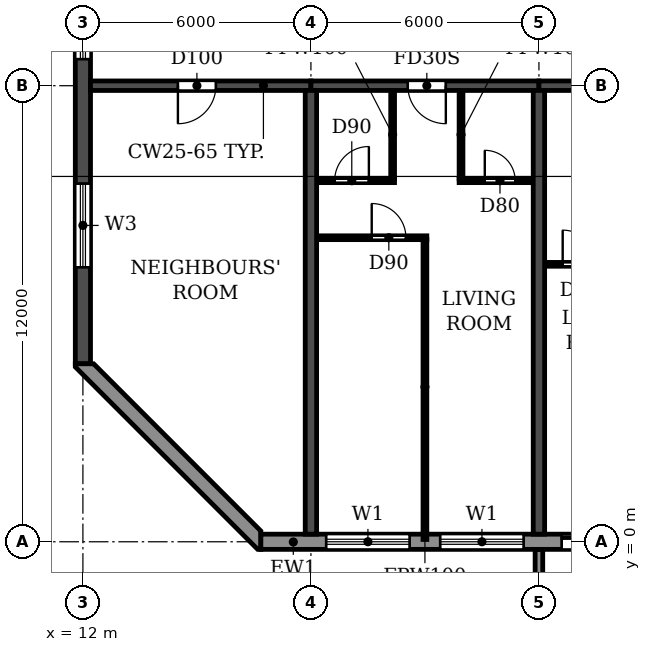
"""IFC4 building model, lengths in metres.
Left out: names, types, materials, properties, quantities, classifications, styles, units other than length and angle.
Written with IfcOpenShell. Run it as: python <this file> out.ifc"""

import sys

from ifc_helpers import new_model, si_unit, direction, frame, frame_2d, origin, place, context, subcontext, project, spatial, polyline, rectangle, outline, extrude, source, transform, mapped, element, fill, save


model = new_model("IFC4")
c1 = context("Model", 3, precision=1e-05, world=origin(), true_north=direction((0.0, 1.0)))
c2 = subcontext(c1, "Body", "Model", "MODEL_VIEW")
j1 = project(units=[si_unit("LENGTHUNIT", "METRE"), si_unit("PLANEANGLEUNIT", "RADIAN")], contexts=[c1])
p1 = place(None, origin())
s1 = spatial("IfcSite", under=j1, at=p1, CompositionType="ELEMENT")
p2 = place(p1, origin())
s2 = spatial("IfcBuilding", under=s1, at=p2, CompositionType="ELEMENT")
p3 = place(p2, frame((0.0, 0.0, 152.1)))
s3 = spatial("IfcBuildingStorey", under=s2, at=p3, CompositionType="ELEMENT", Elevation=152.1)
for number, where, z_axis, x_axis in (
    (1, (18.0, 0.2, 0.0), (0.0, 0.0, 1.0), (0.0, 1.0, 0.0)),
    (2, (24.0, 0.2, 0.0), (0.0, 0.0, 1.0), (0.0, 1.0, 0.0)),
):
    element("IfcWall", number, at=place(p3, frame(where, z_axis=z_axis, x_axis=x_axis)), inside=s3, PredefinedType="SHEAR", context=c2, shape_type="SweptSolid", body=[
        extrude(rectangle(XDim=11.675, YDim=0.3, at=frame_2d((5.837, 0.0))), origin(), (0.0, 0.0, 1.0), 3.07),
    ])
p4 = place(p3, frame((12.0, 4.683, 0.0), z_axis=(0.0, 0.0, 1.0), x_axis=(0.0, 1.0, 0.0)))
e3 = element("IfcWall", 3, at=p4, inside=s3, PredefinedType="SHEAR", context=c2, shape_type="SweptSolid", body=[
    extrude(rectangle(XDim=33.034, YDim=0.4, at=frame_2d((16.517, 0.0))), origin(), (0.0, 0.0, 1.0), 3.07),
])
p5 = place(p4, frame((23.817, 0.0, 0.9)))
e4 = element("IfcOpeningElement", 4, at=p5, cuts=e3, PredefinedType="OPENING", context=c2, shape_type="SweptSolid", body=[
    extrude(rectangle(XDim=1.2, YDim=1.5, at=frame_2d((0.6, 0.75))), frame((0.0, 0.21, 0.0), z_axis=(0.0, -1.0, 0.0), x_axis=(1.0, 0.0, 0.0)), (0.0, 0.0, 1.0), 0.42),
])
p6 = place(p4, frame((8.017, 0.0, 0.9)))
e5 = element("IfcOpeningElement", 5, at=p6, cuts=e3, PredefinedType="OPENING", context=c2, shape_type="SweptSolid", body=[
    extrude(rectangle(XDim=1.2, YDim=1.5, at=frame_2d((0.6, 0.75))), frame((0.0, 0.21, 0.0), z_axis=(0.0, -1.0, 0.0), x_axis=(1.0, 0.0, 0.0)), (0.0, 0.0, 1.0), 0.42),
])
p7 = place(p4, frame((28.293, 0.0, 0.6)))
e6 = element("IfcOpeningElement", 6, at=p7, cuts=e3, PredefinedType="OPENING", context=c2, shape_type="SweptSolid", body=[
    extrude(rectangle(XDim=2.2, YDim=1.8, at=frame_2d((1.1, 0.9))), frame((0.0, 0.21, 0.0), z_axis=(0.0, -1.0, 0.0), x_axis=(1.0, 0.0, 0.0)), (0.0, 0.0, 1.0), 0.42),
])
p8 = place(p4, frame((2.541, 0.0, 0.6)))
e7 = element("IfcOpeningElement", 7, at=p8, cuts=e3, PredefinedType="OPENING", context=c2, shape_type="SweptSolid", body=[
    extrude(rectangle(XDim=2.2, YDim=1.8, at=frame_2d((1.1, 0.9))), frame((0.0, 0.21, 0.0), z_axis=(0.0, -1.0, 0.0), x_axis=(1.0, 0.0, 0.0)), (0.0, 0.0, 1.0), 0.42),
])
p9 = place(p3, frame((12.2, 12.0, 0.0), z_axis=(0.0, 0.0, 1.0), x_axis=(1.0, 0.0, 0.0)))
e8 = element("IfcWall", 8, at=p9, inside=s3, PredefinedType="SHEAR", context=c2, shape_type="SweptSolid", body=[
    extrude(rectangle(XDim=5.8, YDim=0.25, at=frame_2d((2.9, 0.0))), origin(), (0.0, 0.0, 1.0), 2.47),
])
p10 = place(p9, frame((2.3, 0.0, 0.0)))
e9 = element("IfcOpeningElement", 9, at=p10, cuts=e8, PredefinedType="OPENING", context=c2, shape_type="SweptSolid", body=[
    extrude(rectangle(XDim=1.0, YDim=2.1, at=frame_2d((0.5, 1.05))), frame((0.0, 0.135, 0.0), z_axis=(0.0, -1.0, 0.0), x_axis=(1.0, 0.0, 0.0)), (0.0, 0.0, 1.0), 0.27),
])
p11 = place(p3, frame((18.0, 12.0, 0.0), z_axis=(0.0, 0.0, 1.0), x_axis=(1.0, 0.0, 0.0)))
e10 = element("IfcWall", 10, at=p11, inside=s3, PredefinedType="SHEAR", context=c2, shape_type="SweptSolid", body=[
    extrude(rectangle(XDim=6.0, YDim=0.25, at=frame_2d((3.0, 0.0))), origin(), (0.0, 0.0, 1.0), 2.47),
])
p12 = place(p11, frame((2.55, 0.0, 0.0)))
e11 = element("IfcOpeningElement", 11, at=p12, cuts=e10, PredefinedType="OPENING", context=c2, shape_type="SweptSolid", body=[
    extrude(rectangle(XDim=1.0, YDim=2.1, at=frame_2d((0.5, 1.05))), frame((0.0, 0.135, 0.0), z_axis=(0.0, -1.0, 0.0), x_axis=(1.0, 0.0, 0.0)), (0.0, 0.0, 1.0), 0.27),
])
p13 = place(p3, frame((24.0, 12.0, 0.0), z_axis=(0.0, 0.0, 1.0), x_axis=(1.0, 0.0, 0.0)))
e12 = element("IfcWall", 12, at=p13, inside=s3, PredefinedType="SHEAR", context=c2, shape_type="SweptSolid", body=[
    extrude(rectangle(XDim=6.0, YDim=0.25, at=frame_2d((3.0, 0.0))), origin(), (0.0, 0.0, 1.0), 2.47),
])
p14 = place(p13, frame((2.55, 0.0, 0.0)))
e13 = element("IfcOpeningElement", 13, at=p14, cuts=e12, PredefinedType="OPENING", context=c2, shape_type="SweptSolid", body=[
    extrude(rectangle(XDim=1.0, YDim=2.1, at=frame_2d((0.5, 1.05))), frame((0.0, 0.135, 0.0), z_axis=(0.0, -1.0, 0.0), x_axis=(1.0, 0.0, 0.0)), (0.0, 0.0, 1.0), 0.27),
])
p15 = place(p3, frame((16.683, 0.0, 0.0), z_axis=(0.0, 0.0, 1.0), x_axis=(1.0, 0.0, 0.0)))
e14 = element("IfcWall", 14, at=p15, inside=s3, PredefinedType="STANDARD", context=c2, shape_type="SweptSolid", body=[
    extrude(rectangle(XDim=68.634, YDim=0.4, at=frame_2d((34.317, 0.0))), origin(), (0.0, 0.0, 1.0), 3.07),
])
p16 = place(p15, frame((1.717, 0.0, 0.9)))
e15 = element("IfcOpeningElement", 15, at=p16, cuts=e14, PredefinedType="OPENING", context=c2, shape_type="SweptSolid", body=[
    extrude(rectangle(XDim=2.2, YDim=1.5, at=frame_2d((1.1, 0.75))), frame((0.0, 0.21, 0.0), z_axis=(0.0, -1.0, 0.0), x_axis=(1.0, 0.0, 0.0)), (0.0, 0.0, 1.0), 0.42),
])
p17 = place(p15, frame((4.717, 0.0, 0.9)))
e16 = element("IfcOpeningElement", 16, at=p17, cuts=e14, PredefinedType="OPENING", context=c2, shape_type="SweptSolid", body=[
    extrude(rectangle(XDim=2.2, YDim=1.5, at=frame_2d((1.1, 0.75))), frame((0.0, 0.21, 0.0), z_axis=(0.0, -1.0, 0.0), x_axis=(1.0, 0.0, 0.0)), (0.0, 0.0, 1.0), 0.42),
])
p18 = place(p15, frame((7.917, 0.0, 0.0)))
e17 = element("IfcOpeningElement", 17, at=p18, cuts=e14, PredefinedType="OPENING", context=c2, shape_type="SweptSolid", body=[
    extrude(rectangle(XDim=1.8, YDim=2.4, at=frame_2d((0.9, 1.2))), frame((0.0, 0.21, 0.0), z_axis=(0.0, -1.0, 0.0), x_axis=(1.0, 0.0, 0.0)), (0.0, 0.0, 1.0), 0.42),
])
p19 = place(p15, frame((10.717, 0.0, 0.9)))
e18 = element("IfcOpeningElement", 18, at=p19, cuts=e14, PredefinedType="OPENING", context=c2, shape_type="SweptSolid", body=[
    extrude(rectangle(XDim=2.2, YDim=1.5, at=frame_2d((1.1, 0.75))), frame((0.0, 0.21, 0.0), z_axis=(0.0, -1.0, 0.0), x_axis=(1.0, 0.0, 0.0)), (0.0, 0.0, 1.0), 0.42),
])
p20 = place(p15, frame((13.717, 0.0, 0.9)))
e19 = element("IfcOpeningElement", 19, at=p20, cuts=e14, PredefinedType="OPENING", context=c2, shape_type="SweptSolid", body=[
    extrude(rectangle(XDim=2.2, YDim=1.5, at=frame_2d((1.1, 0.75))), frame((0.0, 0.21, 0.0), z_axis=(0.0, -1.0, 0.0), x_axis=(1.0, 0.0, 0.0)), (0.0, 0.0, 1.0), 0.42),
])
p21 = place(p15, frame((16.717, 0.0, 0.9)))
e20 = element("IfcOpeningElement", 20, at=p21, cuts=e14, PredefinedType="OPENING", context=c2, shape_type="SweptSolid", body=[
    extrude(rectangle(XDim=2.2, YDim=1.5, at=frame_2d((1.1, 0.75))), frame((0.0, 0.21, 0.0), z_axis=(0.0, -1.0, 0.0), x_axis=(1.0, 0.0, 0.0)), (0.0, 0.0, 1.0), 0.42),
])
p22 = place(p15, frame((19.717, 0.0, 0.9)))
e21 = element("IfcOpeningElement", 21, at=p22, cuts=e14, PredefinedType="OPENING", context=c2, shape_type="SweptSolid", body=[
    extrude(rectangle(XDim=2.2, YDim=1.5, at=frame_2d((1.1, 0.75))), frame((0.0, 0.21, 0.0), z_axis=(0.0, -1.0, 0.0), x_axis=(1.0, 0.0, 0.0)), (0.0, 0.0, 1.0), 0.42),
])
p23 = place(p15, frame((22.917, 0.0, 0.0)))
e22 = element("IfcOpeningElement", 22, at=p23, cuts=e14, PredefinedType="OPENING", context=c2, shape_type="SweptSolid", body=[
    extrude(rectangle(XDim=1.8, YDim=2.4, at=frame_2d((0.9, 1.2))), frame((0.0, 0.21, 0.0), z_axis=(0.0, -1.0, 0.0), x_axis=(1.0, 0.0, 0.0)), (0.0, 0.0, 1.0), 0.42),
])
p24 = place(p15, frame((25.717, 0.0, 0.9)))
e23 = element("IfcOpeningElement", 23, at=p24, cuts=e14, PredefinedType="OPENING", context=c2, shape_type="SweptSolid", body=[
    extrude(rectangle(XDim=2.2, YDim=1.5, at=frame_2d((1.1, 0.75))), frame((0.0, 0.21, 0.0), z_axis=(0.0, -1.0, 0.0), x_axis=(1.0, 0.0, 0.0)), (0.0, 0.0, 1.0), 0.42),
])
p25 = place(p15, frame((28.717, 0.0, 0.9)))
e24 = element("IfcOpeningElement", 24, at=p25, cuts=e14, PredefinedType="OPENING", context=c2, shape_type="SweptSolid", body=[
    extrude(rectangle(XDim=2.2, YDim=1.5, at=frame_2d((1.1, 0.75))), frame((0.0, 0.21, 0.0), z_axis=(0.0, -1.0, 0.0), x_axis=(1.0, 0.0, 0.0)), (0.0, 0.0, 1.0), 0.42),
])
p26 = place(p15, frame((31.917, 0.0, 0.0)))
e25 = element("IfcOpeningElement", 25, at=p26, cuts=e14, PredefinedType="OPENING", context=c2, shape_type="SweptSolid", body=[
    extrude(rectangle(XDim=1.8, YDim=2.4, at=frame_2d((0.9, 1.2))), frame((0.0, 0.21, 0.0), z_axis=(0.0, -1.0, 0.0), x_axis=(1.0, 0.0, 0.0)), (0.0, 0.0, 1.0), 0.42),
])
p27 = place(p15, frame((34.717, 0.0, 0.9)))
e26 = element("IfcOpeningElement", 26, at=p27, cuts=e14, PredefinedType="OPENING", context=c2, shape_type="SweptSolid", body=[
    extrude(rectangle(XDim=2.2, YDim=1.5, at=frame_2d((1.1, 0.75))), frame((0.0, 0.21, 0.0), z_axis=(0.0, -1.0, 0.0), x_axis=(1.0, 0.0, 0.0)), (0.0, 0.0, 1.0), 0.42),
])
p28 = place(p15, frame((37.717, 0.0, 0.9)))
e27 = element("IfcOpeningElement", 27, at=p28, cuts=e14, PredefinedType="OPENING", context=c2, shape_type="SweptSolid", body=[
    extrude(rectangle(XDim=2.2, YDim=1.5, at=frame_2d((1.1, 0.75))), frame((0.0, 0.21, 0.0), z_axis=(0.0, -1.0, 0.0), x_axis=(1.0, 0.0, 0.0)), (0.0, 0.0, 1.0), 0.42),
])
p29 = place(p15, frame((40.717, 0.0, 0.9)))
e28 = element("IfcOpeningElement", 28, at=p29, cuts=e14, PredefinedType="OPENING", context=c2, shape_type="SweptSolid", body=[
    extrude(rectangle(XDim=2.2, YDim=1.5, at=frame_2d((1.1, 0.75))), frame((0.0, 0.21, 0.0), z_axis=(0.0, -1.0, 0.0), x_axis=(1.0, 0.0, 0.0)), (0.0, 0.0, 1.0), 0.42),
])
p30 = place(p15, frame((43.717, 0.0, 0.9)))
e29 = element("IfcOpeningElement", 29, at=p30, cuts=e14, PredefinedType="OPENING", context=c2, shape_type="SweptSolid", body=[
    extrude(rectangle(XDim=2.2, YDim=1.5, at=frame_2d((1.1, 0.75))), frame((0.0, 0.21, 0.0), z_axis=(0.0, -1.0, 0.0), x_axis=(1.0, 0.0, 0.0)), (0.0, 0.0, 1.0), 0.42),
])
p31 = place(p15, frame((46.917, 0.0, 0.0)))
e30 = element("IfcOpeningElement", 30, at=p31, cuts=e14, PredefinedType="OPENING", context=c2, shape_type="SweptSolid", body=[
    extrude(rectangle(XDim=1.8, YDim=2.4, at=frame_2d((0.9, 1.2))), frame((0.0, 0.21, 0.0), z_axis=(0.0, -1.0, 0.0), x_axis=(1.0, 0.0, 0.0)), (0.0, 0.0, 1.0), 0.42),
])
p32 = place(p15, frame((49.717, 0.0, 0.9)))
e31 = element("IfcOpeningElement", 31, at=p32, cuts=e14, PredefinedType="OPENING", context=c2, shape_type="SweptSolid", body=[
    extrude(rectangle(XDim=2.2, YDim=1.5, at=frame_2d((1.1, 0.75))), frame((0.0, 0.21, 0.0), z_axis=(0.0, -1.0, 0.0), x_axis=(1.0, 0.0, 0.0)), (0.0, 0.0, 1.0), 0.42),
])
p33 = place(p15, frame((52.717, 0.0, 0.9)))
e32 = element("IfcOpeningElement", 32, at=p33, cuts=e14, PredefinedType="OPENING", context=c2, shape_type="SweptSolid", body=[
    extrude(rectangle(XDim=2.2, YDim=1.5, at=frame_2d((1.1, 0.75))), frame((0.0, 0.21, 0.0), z_axis=(0.0, -1.0, 0.0), x_axis=(1.0, 0.0, 0.0)), (0.0, 0.0, 1.0), 0.42),
])
p34 = place(p15, frame((55.717, 0.0, 0.9)))
e33 = element("IfcOpeningElement", 33, at=p34, cuts=e14, PredefinedType="OPENING", context=c2, shape_type="SweptSolid", body=[
    extrude(rectangle(XDim=2.2, YDim=1.5, at=frame_2d((1.1, 0.75))), frame((0.0, 0.21, 0.0), z_axis=(0.0, -1.0, 0.0), x_axis=(1.0, 0.0, 0.0)), (0.0, 0.0, 1.0), 0.42),
])
p35 = place(p15, frame((58.917, 0.0, 0.0)))
e34 = element("IfcOpeningElement", 34, at=p35, cuts=e14, PredefinedType="OPENING", context=c2, shape_type="SweptSolid", body=[
    extrude(rectangle(XDim=1.8, YDim=2.4, at=frame_2d((0.9, 1.2))), frame((0.0, 0.21, 0.0), z_axis=(0.0, -1.0, 0.0), x_axis=(1.0, 0.0, 0.0)), (0.0, 0.0, 1.0), 0.42),
])
p36 = place(p15, frame((61.717, 0.0, 0.9)))
e35 = element("IfcOpeningElement", 35, at=p36, cuts=e14, PredefinedType="OPENING", context=c2, shape_type="SweptSolid", body=[
    extrude(rectangle(XDim=2.2, YDim=1.5, at=frame_2d((1.1, 0.75))), frame((0.0, 0.21, 0.0), z_axis=(0.0, -1.0, 0.0), x_axis=(1.0, 0.0, 0.0)), (0.0, 0.0, 1.0), 0.42),
])
p37 = place(p15, frame((64.717, 0.0, 0.9)))
e36 = element("IfcOpeningElement", 36, at=p37, cuts=e14, PredefinedType="OPENING", context=c2, shape_type="SweptSolid", body=[
    extrude(rectangle(XDim=2.2, YDim=1.5, at=frame_2d((1.1, 0.75))), frame((0.0, 0.21, 0.0), z_axis=(0.0, -1.0, 0.0), x_axis=(1.0, 0.0, 0.0)), (0.0, 0.0, 1.0), 0.42),
])
p38 = place(p3, origin())
e37 = element("IfcWall", 37, at=p38, inside=s3, PredefinedType="STANDARD", context=c2, shape_type="SweptSolid", body=[
    extrude(outline(polyline([(11.8, 4.683), (11.8, 4.6), (16.6, -0.2), (16.683, -0.2), (16.683, 0.283), (12.283, 4.683), (11.8, 4.683)])), origin(), (0.0, 0.0, 1.0), 3.07),
])
m1 = source(origin(), c2, "Body", "SweptSolid", [
    extrude(outline(polyline([(0.0, 0.0), (0.2, 0.0), (0.2, 1.65), (0.0, 1.65), (0.0, 0.0)])), origin(), (0.0, 0.0, 1.0), 3.1),
])
p39 = place(p3, frame((23.9, -1.85, 0.0)))
e38 = element("IfcWall", 38, at=p39, inside=s3, PredefinedType="STANDARD", context=c2, shape_type="MappedRepresentation", body=[
    mapped(m1, transform((0.0, 0.0, 0.0))),
])
p40 = place(p3, frame((24.16, 7.3, 0.0), z_axis=(0.0, 0.0, 1.0), x_axis=(1.0, 0.0, 0.0)))
e39 = element("IfcWall", 39, at=p40, inside=s3, PredefinedType="PARTITIONING", context=c2, shape_type="SweptSolid", body=[
    extrude(rectangle(XDim=2.04, YDim=0.1, at=frame_2d((1.02, 0.0))), origin(), (0.0, 0.0, 1.0), 3.07),
])
p41 = place(p40, frame((0.465, 0.0, 0.0)))
e40 = element("IfcOpeningElement", 40, at=p41, cuts=e39, PredefinedType="OPENING", context=c2, shape_type="SweptSolid", body=[
    extrude(rectangle(XDim=0.9, YDim=2.1, at=frame_2d((0.45, 1.05))), frame((0.0, 0.06, 0.0), z_axis=(0.0, -1.0, 0.0), x_axis=(1.0, 0.0, 0.0)), (0.0, 0.0, 1.0), 0.12),
])
p42 = place(p3, frame((18.16, 8.0, 0.0), z_axis=(0.0, 0.0, 1.0), x_axis=(1.0, 0.0, 0.0)))
e41 = element("IfcWall", 41, at=p42, inside=s3, PredefinedType="PARTITIONING", context=c2, shape_type="SweptSolid", body=[
    extrude(rectangle(XDim=2.89, YDim=0.1, at=frame_2d((1.445, 0.0))), origin(), (0.0, 0.0, 1.0), 3.07),
])
p43 = place(p42, frame((1.44, 0.0, 0.0)))
e42 = element("IfcOpeningElement", 42, at=p43, cuts=e41, PredefinedType="OPENING", context=c2, shape_type="SweptSolid", body=[
    extrude(rectangle(XDim=0.9, YDim=2.1, at=frame_2d((0.45, 1.05))), frame((0.0, 0.06, 0.0), z_axis=(0.0, -1.0, 0.0), x_axis=(1.0, 0.0, 0.0)), (0.0, 0.0, 1.0), 0.12),
])
p44 = place(p3, frame((18.16, 9.5, 0.0), z_axis=(0.0, 0.0, 1.0), x_axis=(1.0, 0.0, 0.0)))
e43 = element("IfcWall", 43, at=p44, inside=s3, PredefinedType="PARTITIONING", context=c2, shape_type="SweptSolid", body=[
    extrude(rectangle(XDim=2.04, YDim=0.1, at=frame_2d((1.02, 0.0))), origin(), (0.0, 0.0, 1.0), 3.07),
])
p45 = place(p44, frame((0.465, 0.0, 0.0)))
e44 = element("IfcOpeningElement", 44, at=p45, cuts=e43, PredefinedType="OPENING", context=c2, shape_type="SweptSolid", body=[
    extrude(rectangle(XDim=0.9, YDim=2.1, at=frame_2d((0.45, 1.05))), frame((0.0, 0.06, 0.0), z_axis=(0.0, -1.0, 0.0), x_axis=(1.0, 0.0, 0.0)), (0.0, 0.0, 1.0), 0.12),
])
p46 = place(p3, frame((21.9, 9.5, 0.0), z_axis=(0.0, 0.0, 1.0), x_axis=(1.0, 0.0, 0.0)))
e45 = element("IfcWall", 45, at=p46, inside=s3, PredefinedType="PARTITIONING", context=c2, shape_type="SweptSolid", body=[
    extrude(rectangle(XDim=1.94, YDim=0.1, at=frame_2d((0.97, 0.0))), origin(), (0.0, 0.0, 1.0), 3.07),
])
p47 = place(p46, frame((0.675, 0.0, 0.0)))
e46 = element("IfcOpeningElement", 46, at=p47, cuts=e45, PredefinedType="OPENING", context=c2, shape_type="SweptSolid", body=[
    extrude(rectangle(XDim=0.8, YDim=2.1, at=frame_2d((0.4, 1.05))), frame((0.0, 0.06, 0.0), z_axis=(0.0, -1.0, 0.0), x_axis=(1.0, 0.0, 0.0)), (0.0, 0.0, 1.0), 0.12),
])
p48 = place(p3, frame((20.15, 9.55, 0.0), z_axis=(0.0, 0.0, 1.0), x_axis=(0.0, 1.0, 0.0)))
e47 = element("IfcWall", 47, at=p48, inside=s3, PredefinedType="PARTITIONING", context=c2, shape_type="SweptSolid", body=[
    extrude(rectangle(XDim=2.315, YDim=0.1, at=frame_2d((1.157, 0.0))), origin(), (0.0, 0.0, 1.0), 3.07),
])
p49 = place(p3, frame((21.0, 0.06, 0.0), z_axis=(0.0, 0.0, 1.0), x_axis=(0.0, 1.0, 0.0)))
e48 = element("IfcWall", 48, at=p49, inside=s3, PredefinedType="PARTITIONING", context=c2, shape_type="SweptSolid", body=[
    extrude(rectangle(XDim=7.89, YDim=0.1, at=frame_2d((3.945, 0.0))), origin(), (0.0, 0.0, 1.0), 3.07),
])
p50 = place(p3, frame((21.95, 9.55, 0.0), z_axis=(0.0, 0.0, 1.0), x_axis=(0.0, 1.0, 0.0)))
e49 = element("IfcWall", 49, at=p50, inside=s3, PredefinedType="PARTITIONING", context=c2, shape_type="SweptSolid", body=[
    extrude(rectangle(XDim=2.315, YDim=0.1, at=frame_2d((1.157, 0.0))), origin(), (0.0, 0.0, 1.0), 3.07),
])
p51 = place(p16, origin())
e50 = element("IfcWindow", 50, at=p51, inside=s3, PartitioningType="DOUBLE_PANEL_HORIZONTAL", PredefinedType="WINDOW", context=c2, shape_type="SweptSolid", body=[
    extrude(rectangle(XDim=2.2, YDim=1.5, at=frame_2d((1.1, 0.75))), frame((0.0, 0.03, 0.0), z_axis=(0.0, -1.0, 0.0), x_axis=(1.0, 0.0, 0.0)), (0.0, 0.0, 1.0), 0.06),
])
fill(e15, e50)
p52 = place(p17, origin())
e51 = element("IfcWindow", 51, at=p52, inside=s3, PartitioningType="DOUBLE_PANEL_HORIZONTAL", PredefinedType="WINDOW", context=c2, shape_type="SweptSolid", body=[
    extrude(rectangle(XDim=2.2, YDim=1.5, at=frame_2d((1.1, 0.75))), frame((0.0, 0.03, 0.0), z_axis=(0.0, -1.0, 0.0), x_axis=(1.0, 0.0, 0.0)), (0.0, 0.0, 1.0), 0.06),
])
fill(e16, e51)
p53 = place(p18, origin())
e52 = element("IfcDoor", 52, at=p53, inside=s3, OperationType="DOUBLE_DOOR_SLIDING", PredefinedType="DOOR", context=c2, shape_type="SweptSolid", body=[
    extrude(rectangle(XDim=1.8, YDim=2.4, at=frame_2d((0.9, 1.2))), frame((0.0, 0.025, 0.0), z_axis=(0.0, -1.0, 0.0), x_axis=(1.0, 0.0, 0.0)), (0.0, 0.0, 1.0), 0.05),
])
fill(e17, e52)
p54 = place(p6, origin())
e53 = element("IfcWindow", 53, at=p54, inside=s3, PartitioningType="SINGLE_PANEL", PredefinedType="WINDOW", context=c2, shape_type="SweptSolid", body=[
    extrude(rectangle(XDim=1.2, YDim=1.5, at=frame_2d((0.6, 0.75))), frame((0.0, 0.03, 0.0), z_axis=(0.0, -1.0, 0.0), x_axis=(1.0, 0.0, 0.0)), (0.0, 0.0, 1.0), 0.06),
])
fill(e5, e53)
p55 = place(p8, origin())
e54 = element("IfcWindow", 54, at=p55, inside=s3, PartitioningType="DOUBLE_PANEL_HORIZONTAL", PredefinedType="WINDOW", context=c2, shape_type="SweptSolid", body=[
    extrude(rectangle(XDim=2.2, YDim=1.8, at=frame_2d((1.1, 0.9))), frame((0.0, 0.03, 0.0), z_axis=(0.0, -1.0, 0.0), x_axis=(1.0, 0.0, 0.0)), (0.0, 0.0, 1.0), 0.06),
])
fill(e7, e54)
p56 = place(p10, frame((1.0, 0.0, 0.0), z_axis=(0.0, 0.0, 1.0), x_axis=(-1.0, 0.0, 0.0)))
e55 = element("IfcDoor", 55, at=p56, inside=s3, OperationType="SINGLE_SWING_RIGHT", PredefinedType="DOOR", context=c2, shape_type="SweptSolid", body=[
    extrude(rectangle(XDim=1.0, YDim=2.1, at=frame_2d((0.5, 1.05))), frame((0.0, 0.025, 0.0), z_axis=(0.0, -1.0, 0.0), x_axis=(1.0, 0.0, 0.0)), (0.0, 0.0, 1.0), 0.05),
])
fill(e9, e55)
p57 = place(p45, origin())
e56 = element("IfcDoor", 56, at=p57, inside=s3, OperationType="SINGLE_SWING_RIGHT", PredefinedType="DOOR", context=c2, shape_type="SweptSolid", body=[
    extrude(rectangle(XDim=0.9, YDim=2.1, at=frame_2d((0.45, 1.05))), frame((0.0, 0.025, 0.0), z_axis=(0.0, -1.0, 0.0), x_axis=(1.0, 0.0, 0.0)), (0.0, 0.0, 1.0), 0.05),
])
fill(e44, e56)
p58 = place(p43, origin())
e57 = element("IfcDoor", 57, at=p58, inside=s3, OperationType="SINGLE_SWING_LEFT", PredefinedType="DOOR", context=c2, shape_type="SweptSolid", body=[
    extrude(rectangle(XDim=0.9, YDim=2.1, at=frame_2d((0.45, 1.05))), frame((0.0, 0.025, 0.0), z_axis=(0.0, -1.0, 0.0), x_axis=(1.0, 0.0, 0.0)), (0.0, 0.0, 1.0), 0.05),
])
fill(e42, e57)
p59 = place(p12, frame((1.0, 0.0, 0.0), z_axis=(0.0, 0.0, 1.0), x_axis=(-1.0, 0.0, 0.0)))
e58 = element("IfcDoor", 58, at=p59, inside=s3, OperationType="SINGLE_SWING_LEFT", PredefinedType="DOOR", context=c2, shape_type="SweptSolid", body=[
    extrude(rectangle(XDim=1.0, YDim=2.1, at=frame_2d((0.5, 1.05))), frame((0.0, 0.025, 0.0), z_axis=(0.0, -1.0, 0.0), x_axis=(1.0, 0.0, 0.0)), (0.0, 0.0, 1.0), 0.05),
])
fill(e11, e58)
p60 = place(p47, origin())
e59 = element("IfcDoor", 59, at=p60, inside=s3, OperationType="SINGLE_SWING_LEFT", PredefinedType="DOOR", context=c2, shape_type="SweptSolid", body=[
    extrude(rectangle(XDim=0.8, YDim=2.1, at=frame_2d((0.4, 1.05))), frame((0.0, 0.025, 0.0), z_axis=(0.0, -1.0, 0.0), x_axis=(1.0, 0.0, 0.0)), (0.0, 0.0, 1.0), 0.05),
])
fill(e46, e59)
p61 = place(p41, origin())
e60 = element("IfcDoor", 60, at=p61, inside=s3, OperationType="SINGLE_SWING_LEFT", PredefinedType="DOOR", context=c2, shape_type="SweptSolid", body=[
    extrude(rectangle(XDim=0.9, YDim=2.1, at=frame_2d((0.45, 1.05))), frame((0.0, 0.025, 0.0), z_axis=(0.0, -1.0, 0.0), x_axis=(1.0, 0.0, 0.0)), (0.0, 0.0, 1.0), 0.05),
])
fill(e40, e60)
save(model, sys.argv[1])
